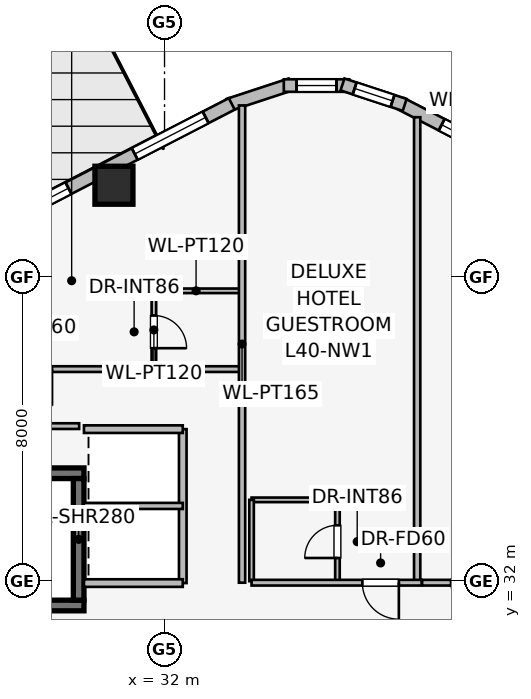
"""IFC4 building model, lengths in metres.
Left out: names, types, materials, properties, quantities, classifications, styles, units other than length and angle.
Written with IfcOpenShell. Run it as: python <this file> out.ifc"""

import sys

from ifc_helpers import new_model, si_unit, direction, frame, frame_2d, origin, origin_2d, place, context, subcontext, project, spatial, rectangle, extrude, element, fill, save


model = new_model("IFC4")
c1 = context("Model", 3, precision=1e-05, world=origin(), true_north=direction((0.0, 1.0)))
c2 = subcontext(c1, "Body", "Model", "MODEL_VIEW")
j1 = project(units=[si_unit("LENGTHUNIT", "METRE"), si_unit("PLANEANGLEUNIT", "RADIAN")], contexts=[c1])
p1 = place(None, origin())
s1 = spatial("IfcSite", under=j1, at=p1, CompositionType="ELEMENT")
p2 = place(p1, origin())
s2 = spatial("IfcBuilding", under=s1, at=p2, CompositionType="ELEMENT")
p3 = place(p2, frame((0.0, 0.0, 149.85)))
s3 = spatial("IfcBuildingStorey", under=s2, at=p3, CompositionType="ELEMENT", Elevation=149.85)
p4 = place(p3, frame((21.52, 31.36, 0.0), z_axis=(0.0, 0.0, 1.0), x_axis=(1.0, 0.0, 0.0)))
e1 = element("IfcWall", 1, at=p4, inside=s3, PredefinedType="SHEAR", context=c2, shape_type="SweptSolid", body=[
    extrude(rectangle(XDim=8.36, YDim=0.28, at=frame_2d((4.18, 0.0))), origin(), (0.0, 0.0, 1.0), 3.45),
])
p5 = place(p4, frame((0.45, 0.0, 0.0)))
e2 = element("IfcOpeningElement", 2, at=p5, cuts=e1, PredefinedType="OPENING", context=c2, shape_type="SweptSolid", body=[
    extrude(rectangle(XDim=1.05, YDim=2.0, at=frame_2d((0.525, 1.0))), frame((0.0, 0.15, 0.0), z_axis=(0.0, -1.0, 0.0), x_axis=(1.0, 0.0, 0.0)), (0.0, 0.0, 1.0), 0.3),
])
p6 = place(p3, frame((29.88, 34.84, 0.0), z_axis=(0.0, 0.0, 1.0), x_axis=(-1.0, 0.0, 0.0)))
e3 = element("IfcWall", 3, at=p6, inside=s3, PredefinedType="SHEAR", context=c2, shape_type="SweptSolid", body=[
    extrude(rectangle(XDim=8.36, YDim=0.28, at=frame_2d((4.18, 0.0))), origin(), (0.0, 0.0, 1.0), 3.45),
])
p7 = place(p3, frame((29.74, 31.5, 0.0), z_axis=(0.0, 0.0, 1.0), x_axis=(0.0, 1.0, 0.0)))
e4 = element("IfcWall", 4, at=p7, inside=s3, PredefinedType="SHEAR", context=c2, shape_type="SweptSolid", body=[
    extrude(rectangle(XDim=3.2, YDim=0.28, at=frame_2d((1.6, 0.0))), origin(), (0.0, 0.0, 1.0), 3.45),
])
p8 = place(p3, frame((30.669, 42.418, 0.0), z_axis=(0.0, 0.0, 1.0), x_axis=(1.0, 0.0, 0.0)))
e5 = element("IfcColumn", 5, at=p8, inside=s3, PredefinedType="COLUMN", context=c2, shape_type="SweptSolid", body=[
    extrude(rectangle(XDim=1.0, YDim=1.0, at=origin_2d()), origin(), (0.0, 0.0, 1.0), 3.45),
])
p9 = place(p3, frame((38.231, 44.558, 0.0), z_axis=(0.0, 0.0, 1.0), x_axis=(0.888613612362, -0.458656568606, 0.0)))
e6 = element("IfcWall", 6, at=p9, inside=s3, PredefinedType="STANDARD", context=c2, shape_type="SweptSolid", body=[
    extrude(rectangle(XDim=18.681, YDim=0.34, at=frame_2d((9.34, 0.0))), origin(), (0.0, 0.0, 1.0), 3.19),
])
p10 = place(p9, frame((1.195, 0.0, 0.75)))
e7 = element("IfcOpeningElement", 7, at=p10, cuts=e6, PredefinedType="OPENING", context=c2, shape_type="SweptSolid", body=[
    extrude(rectangle(XDim=1.6, YDim=1.55, at=frame_2d((0.8, 0.775))), frame((0.0, 0.18, 0.0), z_axis=(0.0, -1.0, 0.0), x_axis=(1.0, 0.0, 0.0)), (0.0, 0.0, 1.0), 0.36),
])
p11 = place(p9, frame((4.831, 0.0, 0.75)))
e8 = element("IfcOpeningElement", 8, at=p11, cuts=e6, PredefinedType="OPENING", context=c2, shape_type="SweptSolid", body=[
    extrude(rectangle(XDim=1.05, YDim=1.4, at=frame_2d((0.525, 0.7))), frame((0.0, 0.18, 0.0), z_axis=(0.0, -1.0, 0.0), x_axis=(1.0, 0.0, 0.0)), (0.0, 0.0, 1.0), 0.36),
])
p12 = place(p9, frame((7.698, 0.0, 0.75)))
e9 = element("IfcOpeningElement", 9, at=p12, cuts=e6, PredefinedType="OPENING", context=c2, shape_type="SweptSolid", body=[
    extrude(rectangle(XDim=1.6, YDim=1.55, at=frame_2d((0.8, 0.775))), frame((0.0, 0.18, 0.0), z_axis=(0.0, -1.0, 0.0), x_axis=(1.0, 0.0, 0.0)), (0.0, 0.0, 1.0), 0.36),
])
p13 = place(p9, frame((11.046, 0.0, 0.75)))
e10 = element("IfcOpeningElement", 10, at=p13, cuts=e6, PredefinedType="OPENING", context=c2, shape_type="SweptSolid", body=[
    extrude(rectangle(XDim=2.1, YDim=1.5, at=frame_2d((1.05, 0.75))), frame((0.0, 0.18, 0.0), z_axis=(0.0, -1.0, 0.0), x_axis=(1.0, 0.0, 0.0)), (0.0, 0.0, 1.0), 0.36),
])
p14 = place(p9, frame((15.833, 0.0, 0.75)))
e11 = element("IfcOpeningElement", 11, at=p14, cuts=e6, PredefinedType="OPENING", context=c2, shape_type="SweptSolid", body=[
    extrude(rectangle(XDim=1.05, YDim=1.4, at=frame_2d((0.525, 0.7))), frame((0.0, 0.18, 0.0), z_axis=(0.0, -1.0, 0.0), x_axis=(1.0, 0.0, 0.0)), (0.0, 0.0, 1.0), 0.36),
])
p15 = place(p3, frame((33.681, 44.532, 0.0), z_axis=(0.0, 0.0, 1.0), x_axis=(0.949937416267, 0.312440242569, 0.0)))
e12 = element("IfcWall", 12, at=p15, inside=s3, PredefinedType="STANDARD", context=c2, shape_type="SweptSolid", body=[
    extrude(rectangle(XDim=1.722, YDim=0.33, at=frame_2d((0.861, 0.0))), origin(), (0.0, 0.0, 1.0), 3.19),
])
p16 = place(p3, frame((35.139, 45.041, 0.0), z_axis=(0.0, 0.0, 1.0), x_axis=(1.0, 0.0, 0.0)))
e13 = element("IfcWall", 13, at=p16, inside=s3, PredefinedType="STANDARD", context=c2, shape_type="SweptSolid", body=[
    extrude(rectangle(XDim=1.722, YDim=0.33, at=frame_2d((0.861, 0.0))), origin(), (0.0, 0.0, 1.0), 3.19),
])
p17 = place(p16, frame((0.336, 0.0, 0.75)))
e14 = element("IfcOpeningElement", 14, at=p17, cuts=e13, PredefinedType="OPENING", context=c2, shape_type="SweptSolid", body=[
    extrude(rectangle(XDim=1.05, YDim=1.4, at=frame_2d((0.525, 0.7))), frame((0.0, 0.175, 0.0), z_axis=(0.0, -1.0, 0.0), x_axis=(1.0, 0.0, 0.0)), (0.0, 0.0, 1.0), 0.35),
])
p18 = place(p3, frame((36.683, 45.07, 0.0), z_axis=(0.0, 0.0, 1.0), x_axis=(0.949937416267, -0.312440242569, 0.0)))
e15 = element("IfcWall", 15, at=p18, inside=s3, PredefinedType="STANDARD", context=c2, shape_type="SweptSolid", body=[
    extrude(rectangle(XDim=1.722, YDim=0.33, at=frame_2d((0.861, 0.0))), origin(), (0.0, 0.0, 1.0), 3.19),
])
p19 = place(p18, frame((0.336, 0.0, 0.75)))
e16 = element("IfcOpeningElement", 16, at=p19, cuts=e15, PredefinedType="OPENING", context=c2, shape_type="SweptSolid", body=[
    extrude(rectangle(XDim=1.05, YDim=1.4, at=frame_2d((0.525, 0.7))), frame((0.0, 0.175, 0.0), z_axis=(0.0, -1.0, 0.0), x_axis=(1.0, 0.0, 0.0)), (0.0, 0.0, 1.0), 0.35),
])
p20 = place(p3, frame((17.169, 35.99, 0.0), z_axis=(0.0, 0.0, 1.0), x_axis=(0.888613612362, 0.458656568606, 0.0)))
e17 = element("IfcWall", 17, at=p20, inside=s3, PredefinedType="STANDARD", context=c2, shape_type="SweptSolid", body=[
    extrude(rectangle(XDim=18.681, YDim=0.34, at=frame_2d((9.34, 0.0))), origin(), (0.0, 0.0, 1.0), 2.494),
])
p21 = place(p20, frame((10.365, 0.0, 0.0)))
e18 = element("IfcOpeningElement", 18, at=p21, cuts=e17, PredefinedType="OPENING", context=c2, shape_type="SweptSolid", body=[
    extrude(rectangle(XDim=1.65, YDim=2.25, at=frame_2d((0.825, 1.125))), frame((0.0, 0.18, 0.0), z_axis=(0.0, -1.0, 0.0), x_axis=(1.0, 0.0, 0.0)), (0.0, 0.0, 1.0), 0.36),
])
p22 = place(p20, frame((1.298, 0.0, 0.75)))
e19 = element("IfcOpeningElement", 19, at=p22, cuts=e17, PredefinedType="OPENING", context=c2, shape_type="SweptSolid", body=[
    extrude(rectangle(XDim=1.05, YDim=1.4, at=frame_2d((0.525, 0.7))), frame((0.0, 0.18, 0.0), z_axis=(0.0, -1.0, 0.0), x_axis=(1.0, 0.0, 0.0)), (0.0, 0.0, 1.0), 0.36),
])
p23 = place(p20, frame((4.743, 0.0, 0.75)))
e20 = element("IfcOpeningElement", 20, at=p23, cuts=e17, PredefinedType="OPENING", context=c2, shape_type="SweptSolid", body=[
    extrude(rectangle(XDim=2.1, YDim=1.5, at=frame_2d((1.05, 0.75))), frame((0.0, 0.18, 0.0), z_axis=(0.0, -1.0, 0.0), x_axis=(1.0, 0.0, 0.0)), (0.0, 0.0, 1.0), 0.36),
])
p24 = place(p20, frame((7.578, 0.0, 0.75)))
e21 = element("IfcOpeningElement", 21, at=p24, cuts=e17, PredefinedType="OPENING", context=c2, shape_type="SweptSolid", body=[
    extrude(rectangle(XDim=2.1, YDim=1.5, at=frame_2d((1.05, 0.75))), frame((0.0, 0.18, 0.0), z_axis=(0.0, -1.0, 0.0), x_axis=(1.0, 0.0, 0.0)), (0.0, 0.0, 1.0), 0.36),
])
p25 = place(p20, frame((12.795, 0.0, 0.75)))
e22 = element("IfcOpeningElement", 22, at=p25, cuts=e17, PredefinedType="OPENING", context=c2, shape_type="SweptSolid", body=[
    extrude(rectangle(XDim=1.05, YDim=1.4, at=frame_2d((0.525, 0.7))), frame((0.0, 0.18, 0.0), z_axis=(0.0, -1.0, 0.0), x_axis=(1.0, 0.0, 0.0)), (0.0, 0.0, 1.0), 0.36),
])
p26 = place(p20, frame((15.808, 0.0, 0.75)))
e23 = element("IfcOpeningElement", 23, at=p26, cuts=e17, PredefinedType="OPENING", context=c2, shape_type="SweptSolid", body=[
    extrude(rectangle(XDim=2.1, YDim=1.5, at=frame_2d((1.05, 0.75))), frame((0.0, 0.18, 0.0), z_axis=(0.0, -1.0, 0.0), x_axis=(1.0, 0.0, 0.0)), (0.0, 0.0, 1.0), 0.36),
])
p27 = place(p3, frame((32.48, 31.95, 0.0), z_axis=(0.0, 0.0, 1.0), x_axis=(0.0, 1.0, 0.0)))
e24 = element("IfcWall", 24, at=p27, inside=s3, PredefinedType="PARTITIONING", context=c2, shape_type="SweptSolid", body=[
    extrude(rectangle(XDim=4.05, YDim=0.2, at=frame_2d((2.025, 0.0))), origin(), (0.0, 0.0, 1.0), 3.19),
])
for number, where, z_axis, x_axis in (
    (25, (29.88, 36.0, 0.0), (0.0, 0.0, 1.0), (1.0, 0.0, 0.0)),
    (26, (32.48, 31.95, 0.0), (0.0, 0.0, 1.0), (-1.0, 0.0, 0.0)),
):
    element("IfcWall", number, at=place(p3, frame(where, z_axis=z_axis, x_axis=x_axis)), inside=s3, PredefinedType="PARTITIONING", context=c2, shape_type="SweptSolid", body=[
        extrude(rectangle(XDim=2.6, YDim=0.2, at=frame_2d((1.3, 0.0))), origin(), (0.0, 0.0, 1.0), 3.19),
    ])
p28 = place(p3, frame((29.875, 33.98, 0.0), z_axis=(0.0, 0.0, 1.0), x_axis=(1.0, 0.0, 0.0)))
e27 = element("IfcWall", 27, at=p28, inside=s3, PredefinedType="PARTITIONING", context=c2, shape_type="SweptSolid", body=[
    extrude(rectangle(XDim=2.605, YDim=0.16, at=frame_2d((1.302, 0.0))), origin(), (0.0, 0.0, 1.0), 3.19),
])
p29 = place(p3, frame((34.0, 39.64, 0.0), z_axis=(0.0, 0.0, 1.0), x_axis=(-1.0, 0.0, 0.0)))
e28 = element("IfcWall", 28, at=p29, inside=s3, PredefinedType="PARTITIONING", context=c2, shape_type="SweptSolid", body=[
    extrude(rectangle(XDim=2.34, YDim=0.12, at=frame_2d((1.17, 0.0))), origin(), (0.0, 0.0, 1.0), 3.19),
])
p30 = place(p3, frame((31.72, 39.64, 0.0), z_axis=(0.0, 0.0, 1.0), x_axis=(0.0, -1.0, 0.0)))
e29 = element("IfcWall", 29, at=p30, inside=s3, PredefinedType="PARTITIONING", context=c2, shape_type="SweptSolid", body=[
    extrude(rectangle(XDim=2.06, YDim=0.12, at=frame_2d((1.03, 0.0))), origin(), (0.0, 0.0, 1.0), 3.19),
])
p31 = place(p30, frame((0.65, 0.0, 0.0)))
e30 = element("IfcOpeningElement", 30, at=p31, cuts=e29, PredefinedType="OPENING", context=c2, shape_type="SweptSolid", body=[
    extrude(rectangle(XDim=0.86, YDim=2.0, at=frame_2d((0.43, 1.0))), frame((0.0, 0.07, 0.0), z_axis=(0.0, -1.0, 0.0), x_axis=(1.0, 0.0, 0.0)), (0.0, 0.0, 1.0), 0.14),
])
p32 = place(p3, frame((34.0, 37.58, 0.0), z_axis=(0.0, 0.0, 1.0), x_axis=(-1.0, 0.0, 0.0)))
e31 = element("IfcWall", 31, at=p32, inside=s3, PredefinedType="PARTITIONING", context=c2, shape_type="SweptSolid", body=[
    extrude(rectangle(XDim=13.707, YDim=0.15, at=frame_2d((6.854, 0.0))), origin(), (0.0, 0.0, 1.0), 2.582),
])
p33 = place(p32, frame((4.96, 0.0, 0.0)))
e32 = element("IfcOpeningElement", 32, at=p33, cuts=e31, PredefinedType="OPENING", context=c2, shape_type="SweptSolid", body=[
    extrude(rectangle(XDim=0.96, YDim=2.0, at=frame_2d((0.48, 1.0))), frame((0.0, 0.085, 0.0), z_axis=(0.0, -1.0, 0.0), x_axis=(1.0, 0.0, 0.0)), (0.0, 0.0, 1.0), 0.17),
])
p34 = place(p3, frame((34.04, 31.96, 0.0), z_axis=(0.0, 0.0, 1.0), x_axis=(0.0, 1.0, 0.0)))
e33 = element("IfcWall", 33, at=p34, inside=s3, PredefinedType="PARTITIONING", context=c2, shape_type="SweptSolid", body=[
    extrude(rectangle(XDim=12.558, YDim=0.165, at=frame_2d((6.279, 0.0))), origin(), (0.0, 0.0, 1.0), 3.19),
])
p35 = place(p3, frame((38.648, 31.97, 0.0), z_axis=(0.0, 0.0, 1.0), x_axis=(0.0, 1.0, 0.0)))
e34 = element("IfcWall", 34, at=p35, inside=s3, PredefinedType="PARTITIONING", context=c2, shape_type="SweptSolid", body=[
    extrude(rectangle(XDim=12.238, YDim=0.165, at=frame_2d((6.119, 0.0))), origin(), (0.0, 0.0, 1.0), 3.19),
])
p36 = place(p3, frame((36.55, 31.96, 0.0), z_axis=(0.0, 0.0, 1.0), x_axis=(0.0, 1.0, 0.0)))
e35 = element("IfcWall", 35, at=p36, inside=s3, PredefinedType="PARTITIONING", context=c2, shape_type="SweptSolid", body=[
    extrude(rectangle(XDim=2.24, YDim=0.12, at=frame_2d((1.12, 0.0))), origin(), (0.0, 0.0, 1.0), 3.19),
])
p37 = place(p36, frame((0.65, 0.0, 0.0)))
e36 = element("IfcOpeningElement", 36, at=p37, cuts=e35, PredefinedType="OPENING", context=c2, shape_type="SweptSolid", body=[
    extrude(rectangle(XDim=0.86, YDim=2.0, at=frame_2d((0.43, 1.0))), frame((0.0, 0.07, 0.0), z_axis=(0.0, -1.0, 0.0), x_axis=(1.0, 0.0, 0.0)), (0.0, 0.0, 1.0), 0.14),
])
p38 = place(p3, frame((36.61, 34.14, 0.0), z_axis=(0.0, 0.0, 1.0), x_axis=(-1.0, 0.0, 0.0)))
e37 = element("IfcWall", 37, at=p38, inside=s3, PredefinedType="PARTITIONING", context=c2, shape_type="SweptSolid", body=[
    extrude(rectangle(XDim=2.32, YDim=0.12, at=frame_2d((1.16, 0.0))), origin(), (0.0, 0.0, 1.0), 3.19),
])
p39 = place(p3, frame((34.29, 34.14, 0.0), z_axis=(0.0, 0.0, 1.0), x_axis=(0.0, -1.0, 0.0)))
e38 = element("IfcWall", 38, at=p39, inside=s3, PredefinedType="PARTITIONING", context=c2, shape_type="SweptSolid", body=[
    extrude(rectangle(XDim=2.14, YDim=0.12, at=frame_2d((1.07, 0.0))), origin(), (0.0, 0.0, 1.0), 3.19),
])
p40 = place(p3, frame((38.768, 31.96, 0.0), z_axis=(0.0, 0.0, 1.0), x_axis=(-1.0, 0.0, 0.0)))
e39 = element("IfcWall", 39, at=p40, inside=s3, PredefinedType="PARTITIONING", context=c2, shape_type="SweptSolid", body=[
    extrude(rectangle(XDim=4.478, YDim=0.15, at=frame_2d((2.239, 0.0))), origin(), (0.0, 0.0, 1.0), 3.19),
])
p41 = place(p40, frame((0.602, 0.0, 0.0)))
e40 = element("IfcOpeningElement", 40, at=p41, cuts=e39, PredefinedType="OPENING", context=c2, shape_type="SweptSolid", body=[
    extrude(rectangle(XDim=0.96, YDim=2.0, at=frame_2d((0.48, 1.0))), frame((0.0, 0.085, 0.0), z_axis=(0.0, -1.0, 0.0), x_axis=(1.0, 0.0, 0.0)), (0.0, 0.0, 1.0), 0.17),
])
p42 = place(p3, frame((41.372, 31.96, 0.0), z_axis=(0.0, 0.0, 1.0), x_axis=(-1.0, 0.0, 0.0)))
e41 = element("IfcWall", 41, at=p42, inside=s3, PredefinedType="PARTITIONING", context=c2, shape_type="SweptSolid", body=[
    extrude(rectangle(XDim=2.594, YDim=0.15, at=frame_2d((1.297, 0.0))), origin(), (0.0, 0.0, 1.0), 3.19),
])
p43 = place(p42, frame((0.874, 0.0, 0.0)))
e42 = element("IfcOpeningElement", 42, at=p43, cuts=e41, PredefinedType="OPENING", context=c2, shape_type="SweptSolid", body=[
    extrude(rectangle(XDim=0.96, YDim=2.0, at=frame_2d((0.48, 1.0))), frame((0.0, 0.085, 0.0), z_axis=(0.0, -1.0, 0.0), x_axis=(1.0, 0.0, 0.0)), (0.0, 0.0, 1.0), 0.17),
])
p44 = place(p3, frame((29.753, 36.08, 0.0), z_axis=(0.0, 0.0, 1.0), x_axis=(-1.0, 0.0, 0.0)))
e43 = element("IfcWall", 43, at=p44, inside=s3, PredefinedType="PARTITIONING", context=c2, shape_type="SweptSolid", body=[
    extrude(rectangle(XDim=7.353, YDim=0.15, at=frame_2d((3.677, 0.0))), origin(), (0.0, 0.0, 1.0), 2.582),
])
p45 = place(p10, origin())
e44 = element("IfcWindow", 44, at=p45, inside=s3, PartitioningType="SINGLE_PANEL", PredefinedType="WINDOW", context=c2, shape_type="SweptSolid", body=[
    extrude(rectangle(XDim=1.6, YDim=1.55, at=frame_2d((0.8, 0.775))), frame((0.0, 0.03, 0.0), z_axis=(0.0, -1.0, 0.0), x_axis=(1.0, 0.0, 0.0)), (0.0, 0.0, 1.0), 0.06),
])
fill(e7, e44)
p46 = place(p17, origin())
e45 = element("IfcWindow", 45, at=p46, inside=s3, PartitioningType="SINGLE_PANEL", PredefinedType="WINDOW", context=c2, shape_type="SweptSolid", body=[
    extrude(rectangle(XDim=1.05, YDim=1.4, at=frame_2d((0.525, 0.7))), frame((0.0, 0.03, 0.0), z_axis=(0.0, -1.0, 0.0), x_axis=(1.0, 0.0, 0.0)), (0.0, 0.0, 1.0), 0.06),
])
fill(e14, e45)
p47 = place(p19, origin())
e46 = element("IfcWindow", 46, at=p47, inside=s3, PartitioningType="SINGLE_PANEL", PredefinedType="WINDOW", context=c2, shape_type="SweptSolid", body=[
    extrude(rectangle(XDim=1.05, YDim=1.4, at=frame_2d((0.525, 0.7))), frame((0.0, 0.03, 0.0), z_axis=(0.0, -1.0, 0.0), x_axis=(1.0, 0.0, 0.0)), (0.0, 0.0, 1.0), 0.06),
])
fill(e16, e46)
p48 = place(p25, origin())
e47 = element("IfcWindow", 47, at=p48, inside=s3, PartitioningType="SINGLE_PANEL", PredefinedType="WINDOW", context=c2, shape_type="SweptSolid", body=[
    extrude(rectangle(XDim=1.05, YDim=1.4, at=frame_2d((0.525, 0.7))), frame((0.0, 0.03, 0.0), z_axis=(0.0, -1.0, 0.0), x_axis=(1.0, 0.0, 0.0)), (0.0, 0.0, 1.0), 0.06),
])
fill(e22, e47)
p49 = place(p26, origin())
e48 = element("IfcWindow", 48, at=p49, inside=s3, PartitioningType="SINGLE_PANEL", PredefinedType="WINDOW", context=c2, shape_type="SweptSolid", body=[
    extrude(rectangle(XDim=2.1, YDim=1.5, at=frame_2d((1.05, 0.75))), frame((0.0, 0.03, 0.0), z_axis=(0.0, -1.0, 0.0), x_axis=(1.0, 0.0, 0.0)), (0.0, 0.0, 1.0), 0.06),
])
fill(e23, e48)
p50 = place(p31, origin())
e49 = element("IfcDoor", 49, at=p50, inside=s3, OperationType="SINGLE_SWING_RIGHT", PredefinedType="DOOR", context=c2, shape_type="SweptSolid", body=[
    extrude(rectangle(XDim=0.86, YDim=2.0, at=frame_2d((0.43, 1.0))), frame((0.0, 0.025, 0.0), z_axis=(0.0, -1.0, 0.0), x_axis=(1.0, 0.0, 0.0)), (0.0, 0.0, 1.0), 0.05),
])
fill(e30, e49)
p51 = place(p37, origin())
e50 = element("IfcDoor", 50, at=p51, inside=s3, OperationType="SINGLE_SWING_LEFT", PredefinedType="DOOR", context=c2, shape_type="SweptSolid", body=[
    extrude(rectangle(XDim=0.86, YDim=2.0, at=frame_2d((0.43, 1.0))), frame((0.0, 0.025, 0.0), z_axis=(0.0, -1.0, 0.0), x_axis=(1.0, 0.0, 0.0)), (0.0, 0.0, 1.0), 0.05),
])
fill(e36, e50)
p52 = place(p41, origin())
e51 = element("IfcDoor", 51, at=p52, inside=s3, OperationType="SINGLE_SWING_LEFT", PredefinedType="DOOR", context=c2, shape_type="SweptSolid", body=[
    extrude(rectangle(XDim=0.96, YDim=2.0, at=frame_2d((0.48, 1.0))), frame((0.0, 0.025, 0.0), z_axis=(0.0, -1.0, 0.0), x_axis=(1.0, 0.0, 0.0)), (0.0, 0.0, 1.0), 0.05),
])
fill(e40, e51)
p53 = place(p43, origin())
e52 = element("IfcDoor", 52, at=p53, inside=s3, OperationType="SINGLE_SWING_LEFT", PredefinedType="DOOR", context=c2, shape_type="SweptSolid", body=[
    extrude(rectangle(XDim=0.96, YDim=2.0, at=frame_2d((0.48, 1.0))), frame((0.0, 0.025, 0.0), z_axis=(0.0, -1.0, 0.0), x_axis=(1.0, 0.0, 0.0)), (0.0, 0.0, 1.0), 0.05),
])
fill(e42, e52)
save(model, sys.argv[1])
